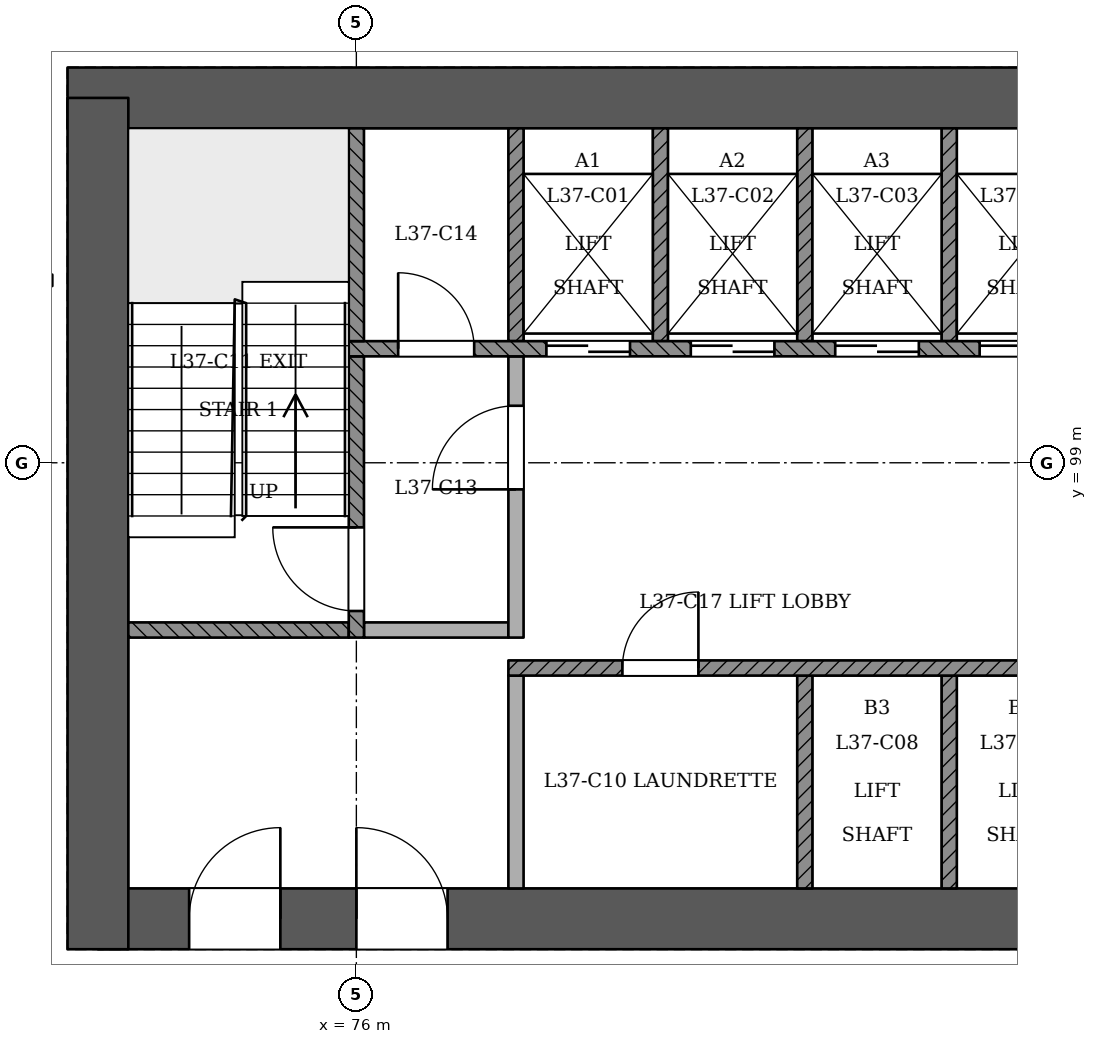
"""IFC4 building model, lengths in metres.
Left out: names, types, materials, properties, quantities, classifications, styles, units other than length and angle.
Written with IfcOpenShell. Run it as: python <this file> out.ifc"""

import sys

from ifc_helpers import new_model, si_unit, direction, frame, frame_2d, origin, place, context, subcontext, project, spatial, rectangle, extrude, element, fill, save


model = new_model("IFC4")
c1 = context("Model", 3, precision=1e-05, world=origin(), true_north=direction((0.0, 1.0)))
c2 = subcontext(c1, "Body", "Model", "MODEL_VIEW")
j1 = project(units=[si_unit("LENGTHUNIT", "METRE"), si_unit("PLANEANGLEUNIT", "RADIAN")], contexts=[c1])
p1 = place(None, origin())
s1 = spatial("IfcSite", under=j1, at=p1, CompositionType="ELEMENT")
p2 = place(p1, origin())
s2 = spatial("IfcBuilding", under=s1, at=p2, CompositionType="ELEMENT")
p3 = place(p2, frame((0.0, 0.0, 145.8)))
s3 = spatial("IfcBuildingStorey", under=s2, at=p3, CompositionType="ELEMENT", Elevation=145.8)
p4 = place(p3, frame((72.6, 93.0, 0.0), z_axis=(0.0, 0.0, 1.0), x_axis=(1.0, 0.0, 0.0)))
e1 = element("IfcWall", 1, at=p4, inside=s3, PredefinedType="SHEAR", context=c2, shape_type="SweptSolid", body=[
    extrude(rectangle(XDim=25.2, YDim=0.8, at=frame_2d((12.6, 0.0))), origin(), (0.0, 0.0, 1.0), 3.6),
])
p5 = place(p4, frame((1.2, 0.0, 0.0)))
e2 = element("IfcOpeningElement", 2, at=p5, cuts=e1, PredefinedType="OPENING", context=c2, shape_type="SweptSolid", body=[
    extrude(rectangle(XDim=1.2, YDim=2.1, at=frame_2d((0.6, 1.05))), frame((0.0, 0.411, 0.0), z_axis=(0.0, -1.0, 0.0), x_axis=(1.0, 0.0, 0.0)), (0.0, 0.0, 1.0), 0.821),
])
p6 = place(p4, frame((3.4, 0.0, 0.0)))
e3 = element("IfcOpeningElement", 3, at=p6, cuts=e1, PredefinedType="OPENING", context=c2, shape_type="SweptSolid", body=[
    extrude(rectangle(XDim=1.2, YDim=2.1, at=frame_2d((0.6, 1.05))), frame((0.0, 0.411, 0.0), z_axis=(0.0, -1.0, 0.0), x_axis=(1.0, 0.0, 0.0)), (0.0, 0.0, 1.0), 0.821),
])
p7 = place(p4, frame((13.4, 0.0, 0.0)))
e4 = element("IfcOpeningElement", 4, at=p7, cuts=e1, PredefinedType="OPENING", context=c2, shape_type="SweptSolid", body=[
    extrude(rectangle(XDim=1.2, YDim=2.1, at=frame_2d((0.6, 1.05))), frame((0.0, 0.411, 0.0), z_axis=(0.0, -1.0, 0.0), x_axis=(1.0, 0.0, 0.0)), (0.0, 0.0, 1.0), 0.821),
])
p8 = place(p4, frame((15.462, 0.0, 0.0)))
e5 = element("IfcOpeningElement", 5, at=p8, cuts=e1, PredefinedType="OPENING", context=c2, shape_type="SweptSolid", body=[
    extrude(rectangle(XDim=1.0, YDim=2.1, at=frame_2d((0.5, 1.05))), frame((0.0, 0.411, 0.0), z_axis=(0.0, -1.0, 0.0), x_axis=(1.0, 0.0, 0.0)), (0.0, 0.0, 1.0), 0.821),
])
p9 = place(p4, frame((17.7, 0.0, 0.0)))
e6 = element("IfcOpeningElement", 6, at=p9, cuts=e1, PredefinedType="OPENING", context=c2, shape_type="SweptSolid", body=[
    extrude(rectangle(XDim=1.0, YDim=2.1, at=frame_2d((0.5, 1.05))), frame((0.0, 0.411, 0.0), z_axis=(0.0, -1.0, 0.0), x_axis=(1.0, 0.0, 0.0)), (0.0, 0.0, 1.0), 0.821),
])
p10 = place(p4, frame((20.25, 0.0, 0.0)))
e7 = element("IfcOpeningElement", 7, at=p10, cuts=e1, PredefinedType="OPENING", context=c2, shape_type="SweptSolid", body=[
    extrude(rectangle(XDim=1.0, YDim=2.1, at=frame_2d((0.5, 1.05))), frame((0.0, 0.411, 0.0), z_axis=(0.0, -1.0, 0.0), x_axis=(1.0, 0.0, 0.0)), (0.0, 0.0, 1.0), 0.821),
])
p11 = place(p4, frame((22.738, 0.0, 0.0)))
e8 = element("IfcOpeningElement", 8, at=p11, cuts=e1, PredefinedType="OPENING", context=c2, shape_type="SweptSolid", body=[
    extrude(rectangle(XDim=1.0, YDim=2.1, at=frame_2d((0.5, 1.05))), frame((0.0, 0.411, 0.0), z_axis=(0.0, -1.0, 0.0), x_axis=(1.0, 0.0, 0.0)), (0.0, 0.0, 1.0), 0.821),
])
p12 = place(p3, frame((97.4, 103.8, 0.0), z_axis=(0.0, 0.0, 1.0), x_axis=(-1.0, 0.0, 0.0)))
e9 = element("IfcWall", 9, at=p12, inside=s3, PredefinedType="SHEAR", context=c2, shape_type="SweptSolid", body=[
    extrude(rectangle(XDim=25.2, YDim=0.8, at=frame_2d((12.6, 0.0))), origin(), (0.0, 0.0, 1.0), 3.6),
])
p13 = place(p3, frame((72.6, 103.8, 0.0), z_axis=(0.0, 0.0, 1.0), x_axis=(0.0, -1.0, 0.0)))
e10 = element("IfcWall", 10, at=p13, inside=s3, PredefinedType="SHEAR", context=c2, shape_type="SweptSolid", body=[
    extrude(rectangle(XDim=11.2, YDim=0.8, at=frame_2d((5.6, 0.0))), origin(), (0.0, 0.0, 1.0), 3.6),
])
p14 = place(p3, frame((66.082, 96.91, 0.0), z_axis=(0.0, 0.0, 1.0), x_axis=(0.500001949747, -0.866024278094, 0.0)))
e11 = element("IfcWall", 11, at=p14, inside=s3, PredefinedType="PARTITIONING", context=c2, shape_type="SweptSolid", body=[
    extrude(rectangle(XDim=37.705, YDim=0.15, at=frame_2d((18.853, 0.0))), origin(), (0.0, 0.0, 1.0), 2.75),
])
p15 = place(p14, frame((1.75, 0.0, 0.0)))
e12 = element("IfcOpeningElement", 12, at=p15, cuts=e11, PredefinedType="OPENING", context=c2, shape_type="SweptSolid", body=[
    extrude(rectangle(XDim=1.0, YDim=2.1, at=frame_2d((0.5, 1.05))), frame((0.0, 0.085, 0.0), z_axis=(0.0, -1.0, 0.0), x_axis=(1.0, 0.0, 0.0)), (0.0, 0.0, 1.0), 0.171),
])
p16 = place(p14, frame((7.329, 0.0, 0.0)))
e13 = element("IfcOpeningElement", 13, at=p16, cuts=e11, PredefinedType="OPENING", context=c2, shape_type="SweptSolid", body=[
    extrude(rectangle(XDim=1.1, YDim=2.1, at=frame_2d((0.55, 1.05))), frame((0.0, 0.085, 0.0), z_axis=(0.0, -1.0, 0.0), x_axis=(1.0, 0.0, 0.0)), (0.0, 0.0, 1.0), 0.171),
])
p17 = place(p14, frame((9.72, 0.0, 0.0)))
e14 = element("IfcOpeningElement", 14, at=p17, cuts=e11, PredefinedType="OPENING", context=c2, shape_type="SweptSolid", body=[
    extrude(rectangle(XDim=1.0, YDim=2.1, at=frame_2d((0.5, 1.05))), frame((0.0, 0.085, 0.0), z_axis=(0.0, -1.0, 0.0), x_axis=(1.0, 0.0, 0.0)), (0.0, 0.0, 1.0), 0.171),
])
p18 = place(p14, frame((16.28, 0.0, 0.0)))
e15 = element("IfcOpeningElement", 15, at=p18, cuts=e11, PredefinedType="OPENING", context=c2, shape_type="SweptSolid", body=[
    extrude(rectangle(XDim=1.0, YDim=2.1, at=frame_2d((0.5, 1.05))), frame((0.0, 0.085, 0.0), z_axis=(0.0, -1.0, 0.0), x_axis=(1.0, 0.0, 0.0)), (0.0, 0.0, 1.0), 0.171),
])
p19 = place(p14, frame((18.72, 0.0, 0.0)))
e16 = element("IfcOpeningElement", 16, at=p19, cuts=e11, PredefinedType="OPENING", context=c2, shape_type="SweptSolid", body=[
    extrude(rectangle(XDim=1.0, YDim=2.1, at=frame_2d((0.5, 1.05))), frame((0.0, 0.085, 0.0), z_axis=(0.0, -1.0, 0.0), x_axis=(1.0, 0.0, 0.0)), (0.0, 0.0, 1.0), 0.171),
])
p20 = place(p14, frame((25.28, 0.0, 0.0)))
e17 = element("IfcOpeningElement", 17, at=p20, cuts=e11, PredefinedType="OPENING", context=c2, shape_type="SweptSolid", body=[
    extrude(rectangle(XDim=1.0, YDim=2.1, at=frame_2d((0.5, 1.05))), frame((0.0, 0.085, 0.0), z_axis=(0.0, -1.0, 0.0), x_axis=(1.0, 0.0, 0.0)), (0.0, 0.0, 1.0), 0.171),
])
p21 = place(p14, frame((27.72, 0.0, 0.0)))
e18 = element("IfcOpeningElement", 18, at=p21, cuts=e11, PredefinedType="OPENING", context=c2, shape_type="SweptSolid", body=[
    extrude(rectangle(XDim=1.0, YDim=2.1, at=frame_2d((0.5, 1.05))), frame((0.0, 0.085, 0.0), z_axis=(0.0, -1.0, 0.0), x_axis=(1.0, 0.0, 0.0)), (0.0, 0.0, 1.0), 0.171),
])
p22 = place(p14, frame((34.329, 0.0, 0.0)))
e19 = element("IfcOpeningElement", 19, at=p22, cuts=e11, PredefinedType="OPENING", context=c2, shape_type="SweptSolid", body=[
    extrude(rectangle(XDim=1.1, YDim=2.1, at=frame_2d((0.55, 1.05))), frame((0.0, 0.085, 0.0), z_axis=(0.0, -1.0, 0.0), x_axis=(1.0, 0.0, 0.0)), (0.0, 0.0, 1.0), 0.171),
])
p23 = place(p3, frame((78.1, 93.4, 0.0), z_axis=(0.0, 0.0, 1.0), x_axis=(0.0, 1.0, 0.0)))
e20 = element("IfcWall", 20, at=p23, inside=s3, PredefinedType="PARTITIONING", context=c2, shape_type="SweptSolid", body=[
    extrude(rectangle(XDim=2.8, YDim=0.2, at=frame_2d((1.4, 0.0))), origin(), (0.0, 0.0, 1.0), 3.15),
])
for number, where, z_axis, x_axis in (
    (21, (81.9, 93.4, 0.0), (0.0, 0.0, 1.0), (0.0, 1.0, 0.0)),
    (22, (83.8, 93.4, 0.0), (0.0, 0.0, 1.0), (0.0, 1.0, 0.0)),
):
    element("IfcWall", number, at=place(p3, frame(where, z_axis=z_axis, x_axis=x_axis)), inside=s3, PredefinedType="SOLIDWALL", context=c2, shape_type="SweptSolid", body=[
        extrude(rectangle(XDim=2.8, YDim=0.2, at=frame_2d((1.4, 0.0))), origin(), (0.0, 0.0, 1.0), 3.15),
    ])
p24 = place(p3, frame((78.0, 96.3, 0.0), z_axis=(0.0, 0.0, 1.0), x_axis=(1.0, 0.0, 0.0)))
e23 = element("IfcWall", 23, at=p24, inside=s3, PredefinedType="SOLIDWALL", context=c2, shape_type="SweptSolid", body=[
    extrude(rectangle(XDim=7.8, YDim=0.2, at=frame_2d((3.9, 0.0))), origin(), (0.0, 0.0, 1.0), 3.15),
])
p25 = place(p24, frame((1.5, 0.0, 0.0)))
e24 = element("IfcOpeningElement", 24, at=p25, cuts=e23, PredefinedType="OPENING", context=c2, shape_type="SweptSolid", body=[
    extrude(rectangle(XDim=1.0, YDim=2.1, at=frame_2d((0.5, 1.05))), frame((0.0, 0.11, 0.0), z_axis=(0.0, -1.0, 0.0), x_axis=(1.0, 0.0, 0.0)), (0.0, 0.0, 1.0), 0.221),
])
p26 = place(p3, frame((73.0, 96.8, 0.0), z_axis=(0.0, 0.0, 1.0), x_axis=(1.0, 0.0, 0.0)))
e25 = element("IfcWall", 25, at=p26, inside=s3, PredefinedType="SOLIDWALL", context=c2, shape_type="SweptSolid", body=[
    extrude(rectangle(XDim=2.9, YDim=0.2, at=frame_2d((1.45, 0.0))), origin(), (0.0, 0.0, 1.0), 3.15),
])
p27 = place(p3, frame((76.0, 96.7, 0.0), z_axis=(0.0, 0.0, 1.0), x_axis=(0.0, 1.0, 0.0)))
e26 = element("IfcWall", 26, at=p27, inside=s3, PredefinedType="SOLIDWALL", context=c2, shape_type="SweptSolid", body=[
    extrude(rectangle(XDim=3.7, YDim=0.2, at=frame_2d((1.85, 0.0))), origin(), (0.0, 0.0, 1.0), 3.15),
])
p28 = place(p27, frame((0.35, 0.0, 0.0)))
e27 = element("IfcOpeningElement", 27, at=p28, cuts=e26, PredefinedType="OPENING", context=c2, shape_type="SweptSolid", body=[
    extrude(rectangle(XDim=1.1, YDim=2.1, at=frame_2d((0.55, 1.05))), frame((0.0, 0.11, 0.0), z_axis=(0.0, -1.0, 0.0), x_axis=(1.0, 0.0, 0.0)), (0.0, 0.0, 1.0), 0.221),
])
p29 = place(p3, frame((76.1, 96.8, 0.0), z_axis=(0.0, 0.0, 1.0), x_axis=(1.0, 0.0, 0.0)))
e28 = element("IfcWall", 28, at=p29, inside=s3, PredefinedType="PARTITIONING", context=c2, shape_type="SweptSolid", body=[
    extrude(rectangle(XDim=1.9, YDim=0.2, at=frame_2d((0.95, 0.0))), origin(), (0.0, 0.0, 1.0), 3.15),
])
p30 = place(p3, frame((78.1, 96.7, 0.0), z_axis=(0.0, 0.0, 1.0), x_axis=(0.0, 1.0, 0.0)))
e29 = element("IfcWall", 29, at=p30, inside=s3, PredefinedType="PARTITIONING", context=c2, shape_type="SweptSolid", body=[
    extrude(rectangle(XDim=3.7, YDim=0.2, at=frame_2d((1.85, 0.0))), origin(), (0.0, 0.0, 1.0), 3.15),
])
p31 = place(p30, frame((1.95, 0.0, 0.0)))
e30 = element("IfcOpeningElement", 30, at=p31, cuts=e29, PredefinedType="OPENING", context=c2, shape_type="SweptSolid", body=[
    extrude(rectangle(XDim=1.1, YDim=2.1, at=frame_2d((0.55, 1.05))), frame((0.0, 0.11, 0.0), z_axis=(0.0, -1.0, 0.0), x_axis=(1.0, 0.0, 0.0)), (0.0, 0.0, 1.0), 0.221),
])
p32 = place(p3, frame((75.9, 100.5, 0.0), z_axis=(0.0, 0.0, 1.0), x_axis=(1.0, 0.0, 0.0)))
e31 = element("IfcWall", 31, at=p32, inside=s3, PredefinedType="SOLIDWALL", context=c2, shape_type="SweptSolid", body=[
    extrude(rectangle(XDim=18.2, YDim=0.2, at=frame_2d((9.1, 0.0))), origin(), (0.0, 0.0, 1.0), 3.15),
])
p33 = place(p32, frame((2.6, 0.0, 0.0)))
e32 = element("IfcOpeningElement", 32, at=p33, cuts=e31, PredefinedType="OPENING", context=c2, shape_type="SweptSolid", body=[
    extrude(rectangle(XDim=1.1, YDim=2.1, at=frame_2d((0.55, 1.05))), frame((0.0, 0.11, 0.0), z_axis=(0.0, -1.0, 0.0), x_axis=(1.0, 0.0, 0.0)), (0.0, 0.0, 1.0), 0.221),
])
p34 = place(p32, frame((4.5, 0.0, 0.0)))
e33 = element("IfcOpeningElement", 33, at=p34, cuts=e31, PredefinedType="OPENING", context=c2, shape_type="SweptSolid", body=[
    extrude(rectangle(XDim=1.1, YDim=2.1, at=frame_2d((0.55, 1.05))), frame((0.0, 0.11, 0.0), z_axis=(0.0, -1.0, 0.0), x_axis=(1.0, 0.0, 0.0)), (0.0, 0.0, 1.0), 0.221),
])
p35 = place(p32, frame((6.4, 0.0, 0.0)))
e34 = element("IfcOpeningElement", 34, at=p35, cuts=e31, PredefinedType="OPENING", context=c2, shape_type="SweptSolid", body=[
    extrude(rectangle(XDim=1.1, YDim=2.1, at=frame_2d((0.55, 1.05))), frame((0.0, 0.11, 0.0), z_axis=(0.0, -1.0, 0.0), x_axis=(1.0, 0.0, 0.0)), (0.0, 0.0, 1.0), 0.221),
])
p36 = place(p32, frame((8.3, 0.0, 0.0)))
e35 = element("IfcOpeningElement", 35, at=p36, cuts=e31, PredefinedType="OPENING", context=c2, shape_type="SweptSolid", body=[
    extrude(rectangle(XDim=1.1, YDim=2.1, at=frame_2d((0.55, 1.05))), frame((0.0, 0.11, 0.0), z_axis=(0.0, -1.0, 0.0), x_axis=(1.0, 0.0, 0.0)), (0.0, 0.0, 1.0), 0.221),
])
p37 = place(p32, frame((10.2, 0.0, 0.0)))
e36 = element("IfcOpeningElement", 36, at=p37, cuts=e31, PredefinedType="OPENING", context=c2, shape_type="SweptSolid", body=[
    extrude(rectangle(XDim=1.1, YDim=2.1, at=frame_2d((0.55, 1.05))), frame((0.0, 0.11, 0.0), z_axis=(0.0, -1.0, 0.0), x_axis=(1.0, 0.0, 0.0)), (0.0, 0.0, 1.0), 0.221),
])
p38 = place(p32, frame((12.1, 0.0, 0.0)))
e37 = element("IfcOpeningElement", 37, at=p38, cuts=e31, PredefinedType="OPENING", context=c2, shape_type="SweptSolid", body=[
    extrude(rectangle(XDim=1.1, YDim=2.1, at=frame_2d((0.55, 1.05))), frame((0.0, 0.11, 0.0), z_axis=(0.0, -1.0, 0.0), x_axis=(1.0, 0.0, 0.0)), (0.0, 0.0, 1.0), 0.221),
])
p39 = place(p32, frame((14.0, 0.0, 0.0)))
e38 = element("IfcOpeningElement", 38, at=p39, cuts=e31, PredefinedType="OPENING", context=c2, shape_type="SweptSolid", body=[
    extrude(rectangle(XDim=1.1, YDim=2.1, at=frame_2d((0.55, 1.05))), frame((0.0, 0.11, 0.0), z_axis=(0.0, -1.0, 0.0), x_axis=(1.0, 0.0, 0.0)), (0.0, 0.0, 1.0), 0.221),
])
p40 = place(p32, frame((0.65, 0.0, 0.0)))
e39 = element("IfcOpeningElement", 39, at=p40, cuts=e31, PredefinedType="OPENING", context=c2, shape_type="SweptSolid", body=[
    extrude(rectangle(XDim=1.0, YDim=2.1, at=frame_2d((0.5, 1.05))), frame((0.0, 0.11, 0.0), z_axis=(0.0, -1.0, 0.0), x_axis=(1.0, 0.0, 0.0)), (0.0, 0.0, 1.0), 0.221),
])
p41 = place(p32, frame((16.3, 0.0, 0.0)))
e40 = element("IfcOpeningElement", 40, at=p41, cuts=e31, PredefinedType="OPENING", context=c2, shape_type="SweptSolid", body=[
    extrude(rectangle(XDim=1.0, YDim=2.1, at=frame_2d((0.5, 1.05))), frame((0.0, 0.11, 0.0), z_axis=(0.0, -1.0, 0.0), x_axis=(1.0, 0.0, 0.0)), (0.0, 0.0, 1.0), 0.221),
])
for number, where, z_axis, x_axis in (
    (41, (76.0, 100.6, 0.0), (0.0, 0.0, 1.0), (0.0, 1.0, 0.0)),
    (42, (78.1, 100.6, 0.0), (0.0, 0.0, 1.0), (0.0, 1.0, 0.0)),
    (43, (80.0, 100.6, 0.0), (0.0, 0.0, 1.0), (0.0, 1.0, 0.0)),
    (44, (81.9, 100.6, 0.0), (0.0, 0.0, 1.0), (0.0, 1.0, 0.0)),
    (45, (83.8, 100.6, 0.0), (0.0, 0.0, 1.0), (0.0, 1.0, 0.0)),
):
    element("IfcWall", number, at=place(p3, frame(where, z_axis=z_axis, x_axis=x_axis)), inside=s3, PredefinedType="SOLIDWALL", context=c2, shape_type="SweptSolid", body=[
        extrude(rectangle(XDim=2.8, YDim=0.2, at=frame_2d((1.4, 0.0))), origin(), (0.0, 0.0, 1.0), 3.15),
    ])
p42 = place(p33, origin())
e46 = element("IfcDoor", 46, at=p42, inside=s3, OperationType="SLIDING_TO_RIGHT", PredefinedType="NOTDEFINED", context=c2, shape_type="SweptSolid", body=[
    extrude(rectangle(XDim=1.1, YDim=2.1, at=frame_2d((0.55, 1.05))), frame((0.0, 0.025, 0.0), z_axis=(0.0, -1.0, 0.0), x_axis=(1.0, 0.0, 0.0)), (0.0, 0.0, 1.0), 0.05),
])
fill(e32, e46)
p43 = place(p34, origin())
e47 = element("IfcDoor", 47, at=p43, inside=s3, OperationType="SLIDING_TO_LEFT", PredefinedType="NOTDEFINED", context=c2, shape_type="SweptSolid", body=[
    extrude(rectangle(XDim=1.1, YDim=2.1, at=frame_2d((0.55, 1.05))), frame((0.0, 0.025, 0.0), z_axis=(0.0, -1.0, 0.0), x_axis=(1.0, 0.0, 0.0)), (0.0, 0.0, 1.0), 0.05),
])
fill(e33, e47)
p44 = place(p35, origin())
e48 = element("IfcDoor", 48, at=p44, inside=s3, OperationType="SLIDING_TO_RIGHT", PredefinedType="NOTDEFINED", context=c2, shape_type="SweptSolid", body=[
    extrude(rectangle(XDim=1.1, YDim=2.1, at=frame_2d((0.55, 1.05))), frame((0.0, 0.025, 0.0), z_axis=(0.0, -1.0, 0.0), x_axis=(1.0, 0.0, 0.0)), (0.0, 0.0, 1.0), 0.05),
])
fill(e34, e48)
p45 = place(p36, origin())
e49 = element("IfcDoor", 49, at=p45, inside=s3, OperationType="SLIDING_TO_LEFT", PredefinedType="NOTDEFINED", context=c2, shape_type="SweptSolid", body=[
    extrude(rectangle(XDim=1.1, YDim=2.1, at=frame_2d((0.55, 1.05))), frame((0.0, 0.025, 0.0), z_axis=(0.0, -1.0, 0.0), x_axis=(1.0, 0.0, 0.0)), (0.0, 0.0, 1.0), 0.05),
])
fill(e35, e49)
p46 = place(p28, origin())
e50 = element("IfcDoor", 50, at=p46, inside=s3, OperationType="SINGLE_SWING_RIGHT", PredefinedType="NOTDEFINED", context=c2, shape_type="SweptSolid", body=[
    extrude(rectangle(XDim=1.1, YDim=2.1, at=frame_2d((0.55, 1.05))), frame((0.0, 0.025, 0.0), z_axis=(0.0, -1.0, 0.0), x_axis=(1.0, 0.0, 0.0)), (0.0, 0.0, 1.0), 0.05),
])
fill(e27, e50)
p47 = place(p31, origin())
e51 = element("IfcDoor", 51, at=p47, inside=s3, OperationType="SINGLE_SWING_LEFT", PredefinedType="NOTDEFINED", context=c2, shape_type="SweptSolid", body=[
    extrude(rectangle(XDim=1.1, YDim=2.1, at=frame_2d((0.55, 1.05))), frame((0.0, 0.025, 0.0), z_axis=(0.0, -1.0, 0.0), x_axis=(1.0, 0.0, 0.0)), (0.0, 0.0, 1.0), 0.05),
])
fill(e30, e51)
p48 = place(p5, origin())
e52 = element("IfcDoor", 52, at=p48, inside=s3, OperationType="SINGLE_SWING_RIGHT", PredefinedType="NOTDEFINED", context=c2, shape_type="SweptSolid", body=[
    extrude(rectangle(XDim=1.2, YDim=2.1, at=frame_2d((0.6, 1.05))), frame((0.0, 0.025, 0.0), z_axis=(0.0, -1.0, 0.0), x_axis=(1.0, 0.0, 0.0)), (0.0, 0.0, 1.0), 0.05),
])
fill(e2, e52)
p49 = place(p6, origin())
e53 = element("IfcDoor", 53, at=p49, inside=s3, OperationType="SINGLE_SWING_LEFT", PredefinedType="NOTDEFINED", context=c2, shape_type="SweptSolid", body=[
    extrude(rectangle(XDim=1.2, YDim=2.1, at=frame_2d((0.6, 1.05))), frame((0.0, 0.025, 0.0), z_axis=(0.0, -1.0, 0.0), x_axis=(1.0, 0.0, 0.0)), (0.0, 0.0, 1.0), 0.05),
])
fill(e3, e53)
p50 = place(p40, origin())
e54 = element("IfcDoor", 54, at=p50, inside=s3, OperationType="SINGLE_SWING_LEFT", PredefinedType="NOTDEFINED", context=c2, shape_type="SweptSolid", body=[
    extrude(rectangle(XDim=1.0, YDim=2.1, at=frame_2d((0.5, 1.05))), frame((0.0, 0.025, 0.0), z_axis=(0.0, -1.0, 0.0), x_axis=(1.0, 0.0, 0.0)), (0.0, 0.0, 1.0), 0.05),
])
fill(e39, e54)
p51 = place(p25, origin())
e55 = element("IfcDoor", 55, at=p51, inside=s3, OperationType="SINGLE_SWING_RIGHT", PredefinedType="NOTDEFINED", context=c2, shape_type="SweptSolid", body=[
    extrude(rectangle(XDim=1.0, YDim=2.1, at=frame_2d((0.5, 1.05))), frame((0.0, 0.025, 0.0), z_axis=(0.0, -1.0, 0.0), x_axis=(1.0, 0.0, 0.0)), (0.0, 0.0, 1.0), 0.05),
])
fill(e24, e55)
save(model, sys.argv[1])
